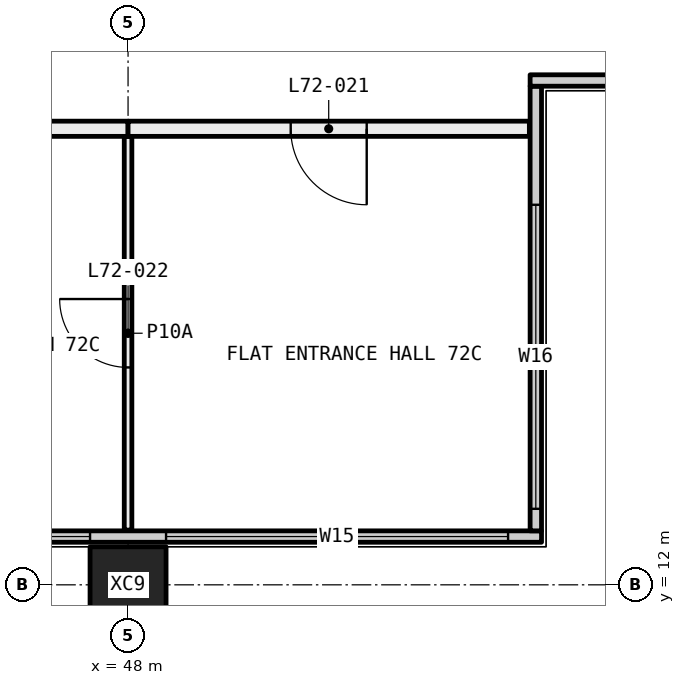
"""IFC4 building model, lengths in metres.
Left out: names, types, materials, properties, quantities, classifications, styles, units other than length and angle.
Written with IfcOpenShell. Run it as: python <this file> out.ifc"""

import sys

from ifc_helpers import new_model, si_unit, direction, frame, frame_2d, origin, origin_2d, place, context, subcontext, project, spatial, rectangle, hollow_rectangle, extrude, element, fill, save


model = new_model("IFC4")
c1 = context("Model", 3, precision=1e-05, world=origin(), true_north=direction((0.0, 1.0)))
c2 = subcontext(c1, "Body", "Model", "MODEL_VIEW")
j1 = project(units=[si_unit("LENGTHUNIT", "METRE"), si_unit("PLANEANGLEUNIT", "RADIAN")], contexts=[c1])
p1 = place(None, origin())
s1 = spatial("IfcSite", under=j1, at=p1, CompositionType="ELEMENT")
p2 = place(p1, origin())
s2 = spatial("IfcBuilding", under=s1, at=p2, CompositionType="ELEMENT")
p3 = place(p2, frame((0.0, 0.0, 266.25)))
s3 = spatial("IfcBuildingStorey", under=s2, at=p3, CompositionType="ELEMENT", Elevation=266.25)
p4 = place(p3, frame((48.0, 12.0, -0.4), z_axis=(0.0, 0.0, 1.0), x_axis=(1.0, 0.0, 0.0)))
e1 = element("IfcColumn", 1, at=p4, inside=s3, PredefinedType="COLUMN", context=c2, shape_type="SweptSolid", body=[
    extrude(hollow_rectangle(XDim=1.0, YDim=1.0, WallThickness=0.036, at=origin_2d()), origin(), (0.0, 0.0, 1.0), 3.45),
])
p5 = place(p3, frame((18.56, 12.635, 0.0), z_axis=(0.0, 0.0, 1.0), x_axis=(1.0, 0.0, 0.0)))
e2 = element("IfcWall", 2, at=p5, inside=s3, PredefinedType="ELEMENTEDWALL", context=c2, shape_type="SweptSolid", body=[
    extrude(rectangle(XDim=34.88, YDim=0.15, at=frame_2d((17.44, 0.0))), origin(), (0.0, 0.0, 1.0), 3.05),
])
p6 = place(p5, frame((0.44, 0.0, 0.45)))
e3 = element("IfcOpeningElement", 3, at=p6, cuts=e2, PredefinedType="OPENING", context=c2, shape_type="SweptSolid", body=[
    extrude(rectangle(XDim=4.5, YDim=2.55, at=frame_2d((2.25, 1.275))), frame((0.0, 0.085, 0.0), z_axis=(0.0, -1.0, 0.0), x_axis=(1.0, 0.0, 0.0)), (0.0, 0.0, 1.0), 0.17),
])
p7 = place(p5, frame((5.94, 0.0, 0.45)))
e4 = element("IfcOpeningElement", 4, at=p7, cuts=e2, PredefinedType="OPENING", context=c2, shape_type="SweptSolid", body=[
    extrude(rectangle(XDim=2.75, YDim=2.55, at=frame_2d((1.375, 1.275))), frame((0.0, 0.085, 0.0), z_axis=(0.0, -1.0, 0.0), x_axis=(1.0, 0.0, 0.0)), (0.0, 0.0, 1.0), 0.17),
])
p8 = place(p5, frame((14.94, 0.0, 0.45)))
e5 = element("IfcOpeningElement", 5, at=p8, cuts=e2, PredefinedType="OPENING", context=c2, shape_type="SweptSolid", body=[
    extrude(rectangle(XDim=2.0, YDim=2.55, at=frame_2d((1.0, 1.275))), frame((0.0, 0.085, 0.0), z_axis=(0.0, -1.0, 0.0), x_axis=(1.0, 0.0, 0.0)), (0.0, 0.0, 1.0), 0.17),
])
p9 = place(p5, frame((17.94, 0.0, 0.45)))
e6 = element("IfcOpeningElement", 6, at=p9, cuts=e2, PredefinedType="OPENING", context=c2, shape_type="SweptSolid", body=[
    extrude(rectangle(XDim=2.75, YDim=2.55, at=frame_2d((1.375, 1.275))), frame((0.0, 0.085, 0.0), z_axis=(0.0, -1.0, 0.0), x_axis=(1.0, 0.0, 0.0)), (0.0, 0.0, 1.0), 0.17),
])
p10 = place(p5, frame((26.19, 0.0, 0.45)))
e7 = element("IfcOpeningElement", 7, at=p10, cuts=e2, PredefinedType="OPENING", context=c2, shape_type="SweptSolid", body=[
    extrude(rectangle(XDim=2.75, YDim=2.55, at=frame_2d((1.375, 1.275))), frame((0.0, 0.085, 0.0), z_axis=(0.0, -1.0, 0.0), x_axis=(1.0, 0.0, 0.0)), (0.0, 0.0, 1.0), 0.17),
])
p11 = place(p5, frame((29.94, 0.0, 0.45)))
e8 = element("IfcOpeningElement", 8, at=p11, cuts=e2, PredefinedType="OPENING", context=c2, shape_type="SweptSolid", body=[
    extrude(rectangle(XDim=4.5, YDim=2.55, at=frame_2d((2.25, 1.275))), frame((0.0, 0.085, 0.0), z_axis=(0.0, -1.0, 0.0), x_axis=(1.0, 0.0, 0.0)), (0.0, 0.0, 1.0), 0.17),
])
p12 = place(p3, frame((53.365, 12.71, 0.0), z_axis=(0.0, 0.0, 1.0), x_axis=(0.0, 1.0, 0.0)))
e9 = element("IfcWall", 9, at=p12, inside=s3, PredefinedType="ELEMENTEDWALL", context=c2, shape_type="SweptSolid", body=[
    extrude(rectangle(XDim=5.85, YDim=0.15, at=frame_2d((2.925, 0.0))), origin(), (0.0, 0.0, 1.0), 3.05),
])
p13 = place(p12, frame((0.29, 0.0, 0.45)))
e10 = element("IfcOpeningElement", 10, at=p13, cuts=e9, PredefinedType="OPENING", context=c2, shape_type="SweptSolid", body=[
    extrude(rectangle(XDim=4.0, YDim=2.55, at=frame_2d((2.0, 1.275))), frame((0.0, 0.085, 0.0), z_axis=(0.0, -1.0, 0.0), x_axis=(1.0, 0.0, 0.0)), (0.0, 0.0, 1.0), 0.17),
])
p14 = place(p3, frame((53.29, 18.635, 0.0), z_axis=(0.0, 0.0, 1.0), x_axis=(1.0, 0.0, 0.0)))
e11 = element("IfcWall", 11, at=p14, inside=s3, PredefinedType="ELEMENTEDWALL", context=c2, shape_type="SweptSolid", body=[
    extrude(rectangle(XDim=6.15, YDim=0.15, at=frame_2d((3.075, 0.0))), origin(), (0.0, 0.0, 1.0), 3.05),
])
p15 = place(p14, frame((1.71, 0.0, 0.45)))
e12 = element("IfcOpeningElement", 12, at=p15, cuts=e11, PredefinedType="OPENING", context=c2, shape_type="SweptSolid", body=[
    extrude(rectangle(XDim=4.0, YDim=2.55, at=frame_2d((2.0, 1.275))), frame((0.0, 0.085, 0.0), z_axis=(0.0, -1.0, 0.0), x_axis=(1.0, 0.0, 0.0)), (0.0, 0.0, 1.0), 0.17),
])
p16 = place(p3, frame((48.0, 12.72, 0.0), z_axis=(0.0, 0.0, 1.0), x_axis=(0.0, 1.0, 0.0)))
e13 = element("IfcWall", 13, at=p16, inside=s3, PredefinedType="PARTITIONING", context=c2, shape_type="SweptSolid", body=[
    extrude(rectangle(XDim=5.18, YDim=0.1, at=frame_2d((2.59, 0.0))), origin(), (0.0, 0.0, 1.0), 3.05),
])
p17 = place(p16, frame((2.14, 0.0, 0.0)))
e14 = element("IfcOpeningElement", 14, at=p17, cuts=e13, PredefinedType="OPENING", context=c2, shape_type="SweptSolid", body=[
    extrude(rectangle(XDim=0.9, YDim=2.1, at=frame_2d((0.45, 1.05))), frame((0.0, 0.06, 0.0), z_axis=(0.0, -1.0, 0.0), x_axis=(1.0, 0.0, 0.0)), (0.0, 0.0, 1.0), 0.12),
])
p18 = place(p3, frame((48.0, 18.0, 0.0), z_axis=(0.0, 0.0, 1.0), x_axis=(-1.0, 0.0, 0.0)))
e15 = element("IfcWall", 15, at=p18, inside=s3, PredefinedType="PARTITIONING", context=c2, shape_type="SweptSolid", body=[
    extrude(rectangle(XDim=1.9, YDim=0.2, at=frame_2d((0.95, 0.0))), origin(), (0.0, 0.0, 1.0), 3.05),
])
p19 = place(p3, frame((53.28, 18.0, 0.0), z_axis=(0.0, 0.0, 1.0), x_axis=(-1.0, 0.0, 0.0)))
e16 = element("IfcWall", 16, at=p19, inside=s3, PredefinedType="PARTITIONING", context=c2, shape_type="SweptSolid", body=[
    extrude(rectangle(XDim=5.28, YDim=0.2, at=frame_2d((2.64, 0.0))), origin(), (0.0, 0.0, 1.0), 3.05),
])
p20 = place(p19, frame((2.14, 0.0, 0.0)))
e17 = element("IfcOpeningElement", 17, at=p20, cuts=e16, PredefinedType="OPENING", context=c2, shape_type="SweptSolid", body=[
    extrude(rectangle(XDim=1.0, YDim=2.1, at=frame_2d((0.5, 1.05))), frame((0.0, 0.11, 0.0), z_axis=(0.0, -1.0, 0.0), x_axis=(1.0, 0.0, 0.0)), (0.0, 0.0, 1.0), 0.22),
])
p21 = place(p10, origin())
e18 = element("IfcWindow", 18, at=p21, inside=s3, PartitioningType="SINGLE_PANEL", PredefinedType="WINDOW", context=c2, shape_type="SweptSolid", body=[
    extrude(rectangle(XDim=2.75, YDim=2.55, at=frame_2d((1.375, 1.275))), frame((0.0, 0.03, 0.0), z_axis=(0.0, -1.0, 0.0), x_axis=(1.0, 0.0, 0.0)), (0.0, 0.0, 1.0), 0.06),
])
fill(e7, e18)
p22 = place(p11, origin())
e19 = element("IfcWindow", 19, at=p22, inside=s3, PartitioningType="SINGLE_PANEL", PredefinedType="WINDOW", context=c2, shape_type="SweptSolid", body=[
    extrude(rectangle(XDim=4.5, YDim=2.55, at=frame_2d((2.25, 1.275))), frame((0.0, 0.03, 0.0), z_axis=(0.0, -1.0, 0.0), x_axis=(1.0, 0.0, 0.0)), (0.0, 0.0, 1.0), 0.06),
])
fill(e8, e19)
p23 = place(p13, origin())
e20 = element("IfcWindow", 20, at=p23, inside=s3, PartitioningType="SINGLE_PANEL", PredefinedType="WINDOW", context=c2, shape_type="SweptSolid", body=[
    extrude(rectangle(XDim=4.0, YDim=2.55, at=frame_2d((2.0, 1.275))), frame((0.0, 0.03, 0.0), z_axis=(0.0, -1.0, 0.0), x_axis=(1.0, 0.0, 0.0)), (0.0, 0.0, 1.0), 0.06),
])
fill(e10, e20)
p24 = place(p20, origin())
e21 = element("IfcDoor", 21, at=p24, inside=s3, OperationType="SINGLE_SWING_RIGHT", PredefinedType="DOOR", context=c2, shape_type="SweptSolid", body=[
    extrude(rectangle(XDim=1.0, YDim=2.1, at=frame_2d((0.5, 1.05))), frame((0.0, 0.025, 0.0), z_axis=(0.0, -1.0, 0.0), x_axis=(1.0, 0.0, 0.0)), (0.0, 0.0, 1.0), 0.05),
])
fill(e17, e21)
p25 = place(p17, origin())
e22 = element("IfcDoor", 22, at=p25, inside=s3, OperationType="SINGLE_SWING_LEFT", PredefinedType="DOOR", context=c2, shape_type="SweptSolid", body=[
    extrude(rectangle(XDim=0.9, YDim=2.1, at=frame_2d((0.45, 1.05))), frame((0.0, 0.025, 0.0), z_axis=(0.0, -1.0, 0.0), x_axis=(1.0, 0.0, 0.0)), (0.0, 0.0, 1.0), 0.05),
])
fill(e14, e22)
save(model, sys.argv[1])
